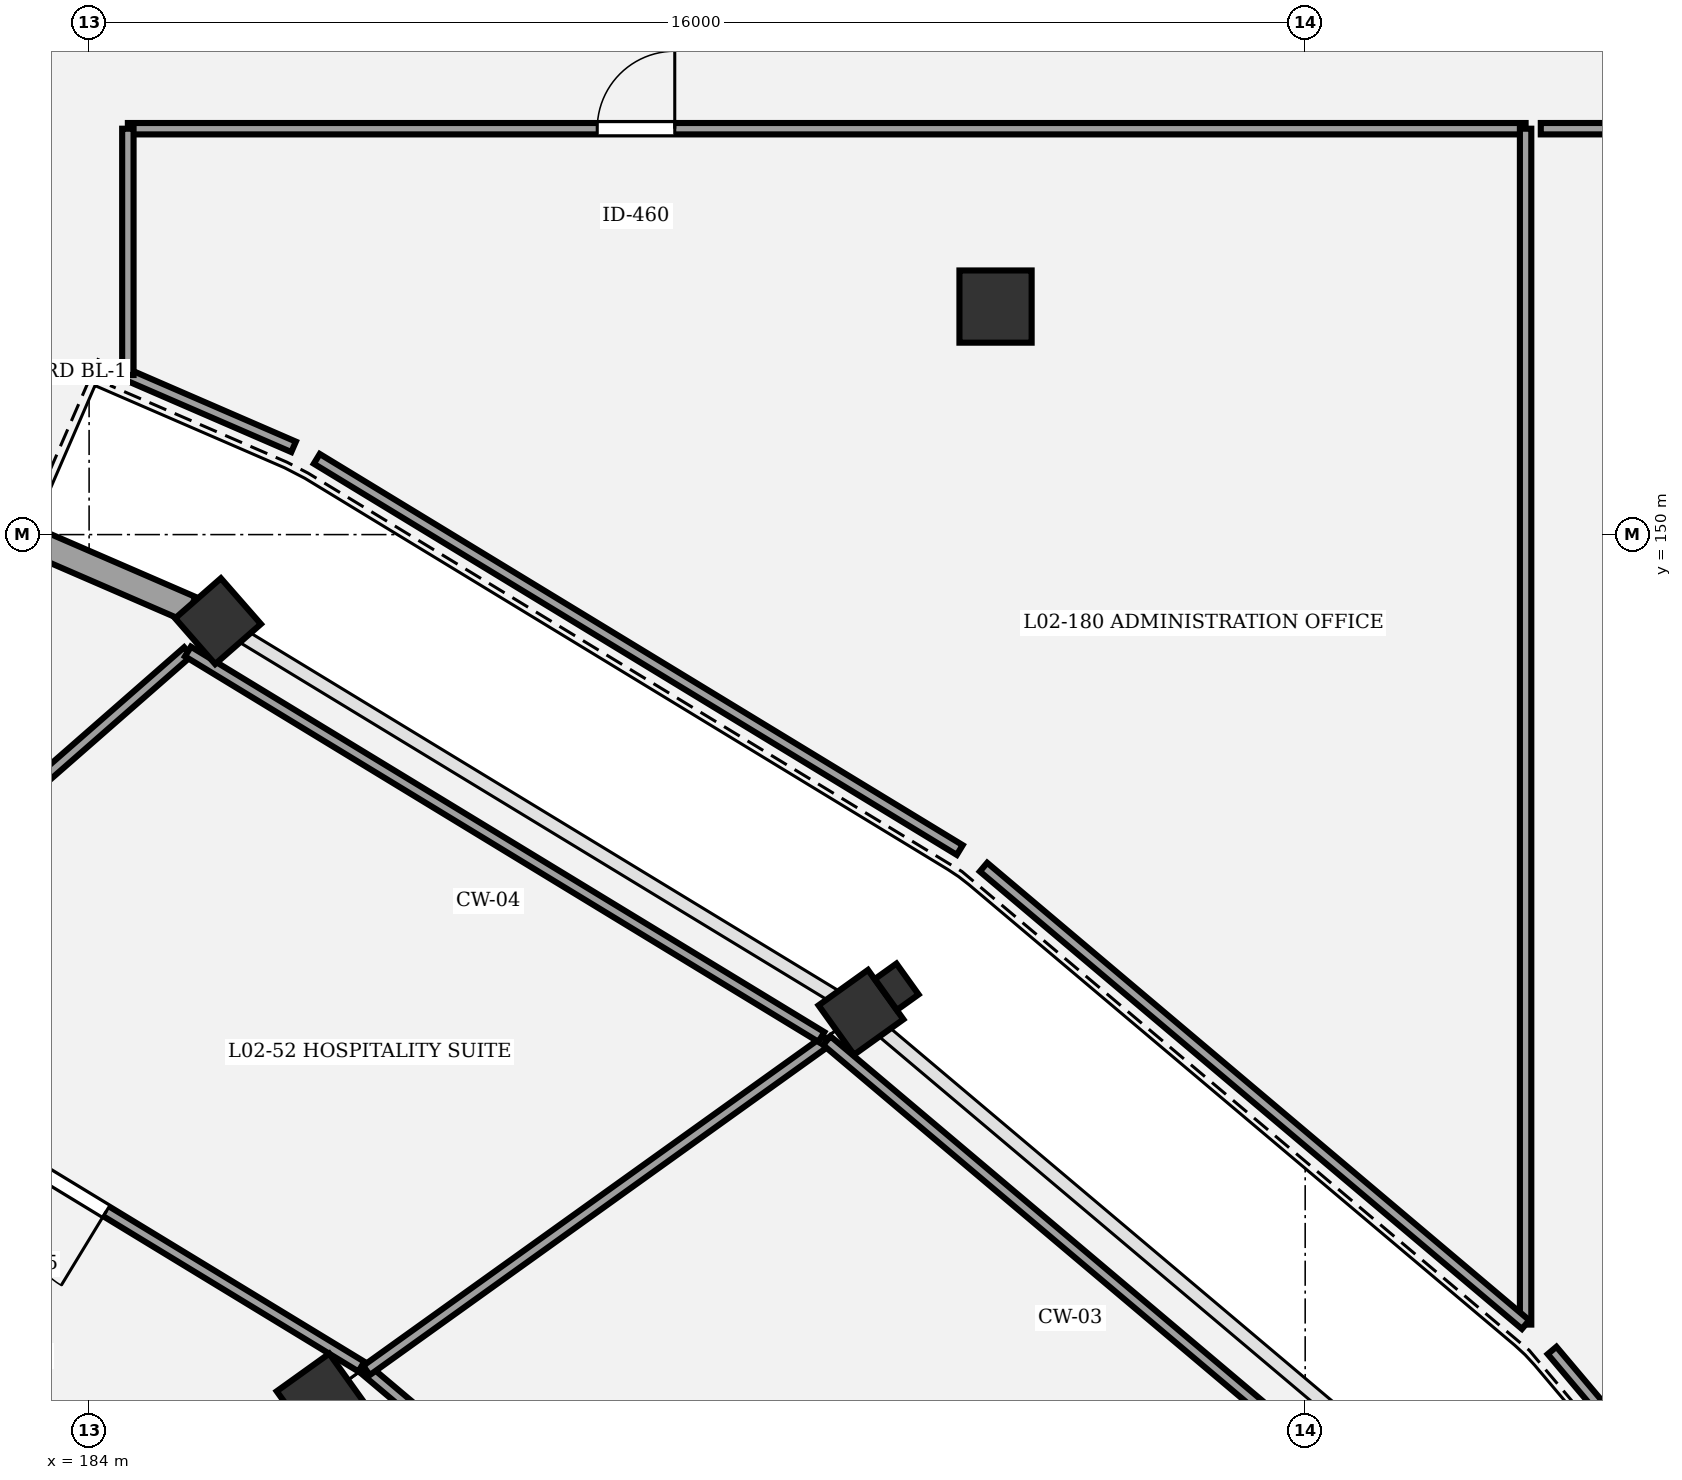
"""IFC4 building model, lengths in metres.
Left out: names, types, materials, properties, quantities, classifications, styles, units other than length and angle.
Written with IfcOpenShell. Run it as: python <this file> out.ifc"""

import sys

from ifc_helpers import new_model, si_unit, direction, frame, frame_2d, origin, origin_2d, place, context, subcontext, project, spatial, rectangle, circle, extrude, element, fill, save


model = new_model("IFC4")
c1 = context("Model", 3, precision=1e-05, world=origin(), true_north=direction((0.0, 1.0)))
c2 = subcontext(c1, "Body", "Model", "MODEL_VIEW")
j1 = project(units=[si_unit("LENGTHUNIT", "METRE"), si_unit("PLANEANGLEUNIT", "RADIAN")], contexts=[c1])
p1 = place(None, origin())
s1 = spatial("IfcSite", under=j1, at=p1, CompositionType="ELEMENT")
p2 = place(p1, origin())
s2 = spatial("IfcBuilding", under=s1, at=p2, CompositionType="ELEMENT")
p3 = place(p2, frame((0.0, 0.0, 10.2)))
s3 = spatial("IfcBuildingStorey", under=s2, at=p3, CompositionType="ELEMENT", Elevation=10.2)
p4 = place(p3, frame((187.061, 138.632, 0.0), z_axis=(0.0, 0.0, 1.0), x_axis=(0.812897512265, 0.582406760395, 0.0)))
e1 = element("IfcColumn", 1, at=p4, inside=s3, PredefinedType="COLUMN", context=c2, shape_type="SweptSolid", body=[
    extrude(rectangle(XDim=0.85, YDim=0.85, at=origin_2d()), origin(), (0.0, 0.0, 1.0), 4.5),
])
p5 = place(p3, frame((194.156, 143.715, 0.0), z_axis=(0.0, 0.0, 1.0), x_axis=(0.812897512265, 0.582406760395, 0.0)))
e2 = element("IfcColumn", 2, at=p5, inside=s3, PredefinedType="COLUMN", context=c2, shape_type="SweptSolid", body=[
    extrude(rectangle(XDim=0.8, YDim=0.8, at=origin_2d()), origin(), (0.0, 0.0, 1.0), 4.5),
])
p6 = place(p3, frame((194.625, 144.051, 0.0), z_axis=(0.0, 0.0, 1.0), x_axis=(-0.582406760395, 0.812897512265, 0.0)))
e3 = element("IfcColumn", 3, at=p6, inside=s3, PredefinedType="PILASTER", context=c2, shape_type="SweptSolid", body=[
    extrude(rectangle(XDim=0.5, YDim=0.35, at=origin_2d()), origin(), (0.0, 0.0, 1.0), 4.5),
])
p7 = place(p3, frame((185.696, 148.861, 0.0), z_axis=(0.0, 0.0, 1.0), x_axis=(0.752529860433, 0.658558128912, 0.0)))
e4 = element("IfcColumn", 4, at=p7, inside=s3, PredefinedType="COLUMN", context=c2, shape_type="SweptSolid", body=[
    extrude(rectangle(XDim=0.8, YDim=0.8, at=origin_2d()), origin(), (0.0, 0.0, 1.0), 4.5),
])
p8 = place(p3, frame((195.926, 153.0, 0.0), z_axis=(0.0, 0.0, 1.0), x_axis=(1.0, 0.0, 0.0)))
e5 = element("IfcColumn", 5, at=p8, inside=s3, PredefinedType="COLUMN", context=c2, shape_type="SweptSolid", body=[
    extrude(circle(Radius=0.475, at=origin_2d()), origin(), (0.0, 0.0, 1.0), 4.5),
])
p9 = place(p3, frame((176.303, 152.933, 0.0), z_axis=(0.0, 0.0, 1.0), x_axis=(0.917498288986, -0.397739726088, 0.0)))
e6 = element("IfcWall", 6, at=p9, inside=s3, PredefinedType="STANDARD", context=c2, shape_type="SweptSolid", body=[
    extrude(rectangle(XDim=9.84, YDim=0.35, at=frame_2d((4.92, 0.0))), origin(), (0.0, 0.0, 1.0), 3.42),
])
p10 = place(p9, frame((4.02, 0.0, 0.0)))
e7 = element("IfcOpeningElement", 7, at=p10, cuts=e6, PredefinedType="OPENING", context=c2, shape_type="SweptSolid", body=[
    extrude(rectangle(XDim=1.8, YDim=2.4, at=frame_2d((0.9, 1.2))), frame((0.0, 0.185, 0.0), z_axis=(0.0, -1.0, 0.0), x_axis=(1.0, 0.0, 0.0)), (0.0, 0.0, 1.0), 0.37),
])
p11 = place(p3, frame((194.175, 133.497, 0.0), z_axis=(0.0, 0.0, 1.0), x_axis=(-0.764257572309, 0.644911128117, 0.0)))
e8 = element("IfcWall", 8, at=p11, inside=s3, PredefinedType="PARTITIONING", context=c2, shape_type="SweptSolid", body=[
    extrude(rectangle(XDim=8.539, YDim=0.15, at=frame_2d((4.269, 0.0))), origin(), (0.0, 0.0, 1.0), 3.25),
])
p12 = place(p11, frame((3.739, 0.0, 0.0)))
e9 = element("IfcOpeningElement", 9, at=p12, cuts=e8, PredefinedType="OPENING", context=c2, shape_type="SweptSolid", body=[
    extrude(rectangle(XDim=1.06, YDim=2.3, at=frame_2d((0.53, 1.15))), frame((0.0, 0.085, 0.0), z_axis=(0.0, -1.0, 0.0), x_axis=(1.0, 0.0, 0.0)), (0.0, 0.0, 1.0), 0.17),
])
p13 = place(p3, frame((187.582, 139.054, 0.0), z_axis=(0.0, 0.0, 1.0), x_axis=(-0.854321649351, 0.519744667554, 0.0)))
e10 = element("IfcWall", 10, at=p13, inside=s3, PredefinedType="PARTITIONING", context=c2, shape_type="SweptSolid", body=[
    extrude(rectangle(XDim=8.999, YDim=0.15, at=frame_2d((4.499, 0.0))), origin(), (0.0, 0.0, 1.0), 3.25),
])
p14 = place(p13, frame((3.929, 0.0, 0.0)))
e11 = element("IfcOpeningElement", 11, at=p14, cuts=e10, PredefinedType="OPENING", context=c2, shape_type="SweptSolid", body=[
    extrude(rectangle(XDim=1.14, YDim=2.3, at=frame_2d((0.57, 1.15))), frame((0.0, 0.085, 0.0), z_axis=(0.0, -1.0, 0.0), x_axis=(1.0, 0.0, 0.0)), (0.0, 0.0, 1.0), 0.17),
])
p15 = place(p3, frame((184.51, 155.34, 0.0), z_axis=(0.0, 0.0, 1.0), x_axis=(1.0, 0.0, 0.0)))
e12 = element("IfcWall", 12, at=p15, inside=s3, PredefinedType="PARTITIONING", context=c2, shape_type="SweptSolid", body=[
    extrude(rectangle(XDim=18.39, YDim=0.15, at=frame_2d((9.195, 0.0))), origin(), (0.0, 0.0, 1.0), 3.25),
])
p16 = place(p15, frame((6.176, 0.0, 0.0)))
e13 = element("IfcOpeningElement", 13, at=p16, cuts=e12, PredefinedType="OPENING", context=c2, shape_type="SweptSolid", body=[
    extrude(rectangle(XDim=1.02, YDim=2.3, at=frame_2d((0.51, 1.15))), frame((0.0, 0.085, 0.0), z_axis=(0.0, -1.0, 0.0), x_axis=(1.0, 0.0, 0.0)), (0.0, 0.0, 1.0), 0.17),
])
p17 = place(p3, frame((187.649, 139.004, 0.0), z_axis=(0.0, 0.0, 1.0), x_axis=(0.812884613266, 0.582424763824, 0.0)))
e14 = element("IfcWall", 14, at=p17, inside=s3, PredefinedType="PARTITIONING", context=c2, shape_type="SweptSolid", body=[
    extrude(rectangle(XDim=7.45, YDim=0.15, at=frame_2d((3.725, 0.0))), origin(), (0.0, 0.0, 1.0), 3.25),
])
p18 = place(p3, frame((193.706, 143.343, 0.0), z_axis=(0.0, 0.0, 1.0), x_axis=(0.764252893528, -0.644916672706, 0.0)))
e15 = element("IfcWall", 15, at=p18, inside=s3, PredefinedType="PARTITIONING", context=c2, shape_type="SweptSolid", body=[
    extrude(rectangle(XDim=9.257, YDim=0.15, at=frame_2d((4.629, 0.0))), origin(), (0.0, 0.0, 1.0), 3.25),
])
p19 = place(p3, frame((179.895, 143.731, 0.0), z_axis=(0.0, 0.0, 1.0), x_axis=(0.752564061831, 0.658519045162, 0.0)))
e16 = element("IfcWall", 16, at=p19, inside=s3, PredefinedType="PARTITIONING", context=c2, shape_type="SweptSolid", body=[
    extrude(rectangle(XDim=7.183, YDim=0.15, at=frame_2d((3.592, 0.0))), origin(), (0.0, 0.0, 1.0), 3.25),
])
p20 = place(p3, frame((185.3, 148.461, 0.0), z_axis=(0.0, 0.0, 1.0), x_axis=(0.854323689683, -0.519741313777, 0.0)))
e17 = element("IfcWall", 17, at=p20, inside=s3, PredefinedType="PARTITIONING", context=c2, shape_type="SweptSolid", body=[
    extrude(rectangle(XDim=9.756, YDim=0.15, at=frame_2d((4.878, 0.0))), origin(), (0.0, 0.0, 1.0), 3.25),
])
p21 = place(p3, frame((195.455, 145.85, 0.0), z_axis=(0.0, 0.0, 1.0), x_axis=(-0.854333268174, 0.519725568826, 0.0)))
e18 = element("IfcWall", 18, at=p21, inside=s3, PredefinedType="PARTITIONING", context=c2, shape_type="SweptSolid", body=[
    extrude(rectangle(XDim=9.902, YDim=0.15, at=frame_2d((4.951, 0.0))), origin(), (0.0, 0.0, 1.0), 3.25),
])
p22 = place(p3, frame((186.69, 151.155, 0.0), z_axis=(0.0, 0.0, 1.0), x_axis=(-0.917484400903, 0.397771761314, 0.0)))
e19 = element("IfcWall", 19, at=p22, inside=s3, PredefinedType="PARTITIONING", context=c2, shape_type="SweptSolid", body=[
    extrude(rectangle(XDim=2.376, YDim=0.15, at=frame_2d((1.188, 0.0))), origin(), (0.0, 0.0, 1.0), 3.25),
])
p23 = place(p3, frame((184.51, 152.1, 0.0), z_axis=(0.0, 0.0, 1.0), x_axis=(0.0, 1.0, 0.0)))
e20 = element("IfcWall", 20, at=p23, inside=s3, PredefinedType="PARTITIONING", context=c2, shape_type="SweptSolid", body=[
    extrude(rectangle(XDim=3.24, YDim=0.15, at=frame_2d((1.62, 0.0))), origin(), (0.0, 0.0, 1.0), 3.25),
])
p24 = place(p3, frame((202.9, 155.34, 0.0), z_axis=(0.0, 0.0, 1.0), x_axis=(0.0, -1.0, 0.0)))
e21 = element("IfcWall", 21, at=p24, inside=s3, PredefinedType="PARTITIONING", context=c2, shape_type="SweptSolid", body=[
    extrude(rectangle(XDim=15.733, YDim=0.15, at=frame_2d((7.867, 0.0))), origin(), (0.0, 0.0, 1.0), 3.25),
])
p25 = place(p3, frame((202.9, 139.607, 0.0), z_axis=(0.0, 0.0, 1.0), x_axis=(-0.764245949545, 0.644924901523, 0.0)))
e22 = element("IfcWall", 22, at=p25, inside=s3, PredefinedType="PARTITIONING", context=c2, shape_type="SweptSolid", body=[
    extrude(rectangle(XDim=9.332, YDim=0.15, at=frame_2d((4.666, 0.0))), origin(), (0.0, 0.0, 1.0), 3.25),
])
p26 = place(p3, frame((209.153, 132.274, 0.0), z_axis=(0.0, 0.0, 1.0), x_axis=(-0.645180125691, 0.764030500316, 0.0)))
e23 = element("IfcWall", 23, at=p26, inside=s3, PredefinedType="PARTITIONING", context=c2, shape_type="SweptSolid", body=[
    extrude(rectangle(XDim=9.151, YDim=0.15, at=frame_2d((4.576, 0.0))), origin(), (0.0, 0.0, 1.0), 3.25),
])
p27 = place(p3, frame((203.1, 155.34, 0.0), z_axis=(0.0, 0.0, 1.0), x_axis=(0.99999997621, 0.00021812629, 0.0)))
e24 = element("IfcWall", 24, at=p27, inside=s3, PredefinedType="PARTITIONING", context=c2, shape_type="SweptSolid", body=[
    extrude(rectangle(XDim=13.431, YDim=0.15, at=frame_2d((6.716, 0.0))), origin(), (0.0, 0.0, 1.0), 3.25),
])
p28 = place(p14, origin())
e25 = element("IfcDoor", 25, at=p28, inside=s3, OperationType="SINGLE_SWING_LEFT", PredefinedType="DOOR", context=c2, shape_type="SweptSolid", body=[
    extrude(rectangle(XDim=1.14, YDim=2.3, at=frame_2d((0.57, 1.15))), frame((0.0, 0.025, 0.0), z_axis=(0.0, -1.0, 0.0), x_axis=(1.0, 0.0, 0.0)), (0.0, 0.0, 1.0), 0.05),
])
fill(e11, e25)
p29 = place(p16, origin())
e26 = element("IfcDoor", 26, at=p29, inside=s3, OperationType="SINGLE_SWING_RIGHT", PredefinedType="DOOR", context=c2, shape_type="SweptSolid", body=[
    extrude(rectangle(XDim=1.02, YDim=2.3, at=frame_2d((0.51, 1.15))), frame((0.0, 0.025, 0.0), z_axis=(0.0, -1.0, 0.0), x_axis=(1.0, 0.0, 0.0)), (0.0, 0.0, 1.0), 0.05),
])
fill(e13, e26)
save(model, sys.argv[1])
